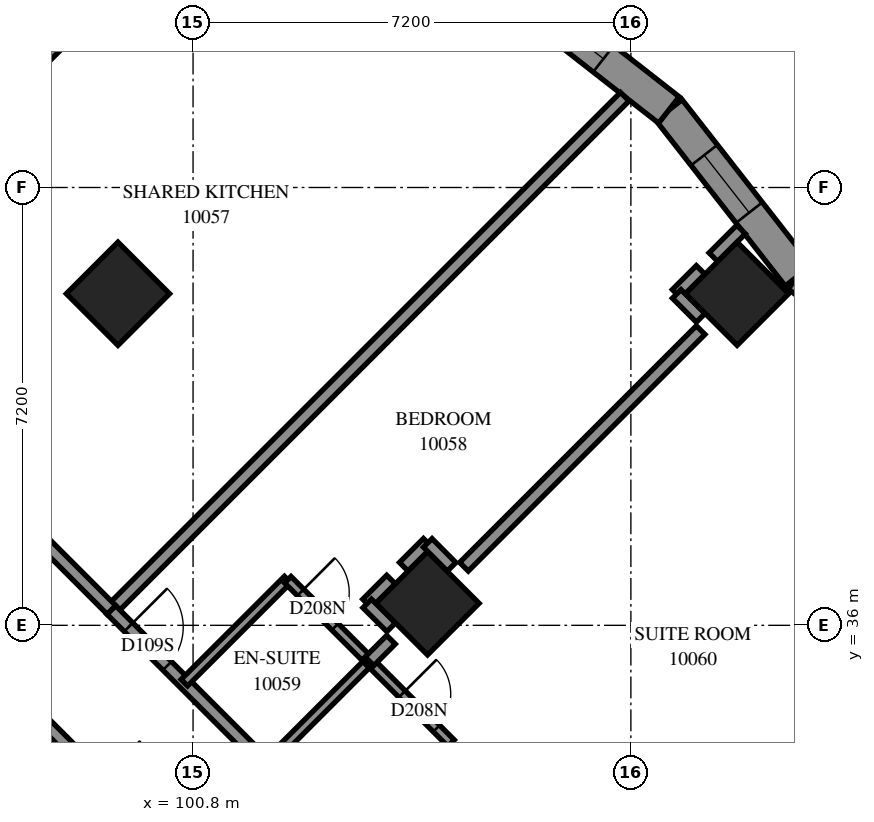
"""IFC4 building model, lengths in metres.
Left out: names, types, materials, properties, quantities, classifications, styles, units other than length and angle.
Written with IfcOpenShell. Run it as: python <this file> out.ifc"""

import sys

from ifc_helpers import new_model, si_unit, direction, frame, frame_2d, origin, origin_2d, place, context, subcontext, project, spatial, polyline, rectangle, outline, extrude, element, fill, save


model = new_model("IFC4")
c1 = context("Model", 3, precision=1e-05, world=origin(), true_north=direction((0.0, 1.0)))
c2 = subcontext(c1, "Body", "Model", "MODEL_VIEW")
j1 = project(units=[si_unit("LENGTHUNIT", "METRE"), si_unit("PLANEANGLEUNIT", "RADIAN")], contexts=[c1])
p1 = place(None, origin())
s1 = spatial("IfcSite", under=j1, at=p1, CompositionType="ELEMENT")
p2 = place(p1, origin())
s2 = spatial("IfcBuilding", under=s1, at=p2, CompositionType="ELEMENT")
p3 = place(p2, frame((0.0, 0.0, 40.6)))
s3 = spatial("IfcBuildingStorey", under=s2, at=p3, CompositionType="ELEMENT", Elevation=40.6)
for number, where, z_axis, x_axis in (
    (1, (99.565, 41.453, 0.0), (0.0, 0.0, 1.0), (0.707, -0.707, 0.0)),
    (2, (109.747, 41.453, 0.0), (0.0, 0.0, 1.0), (0.707, -0.707, 0.0)),
    (3, (104.656, 36.362, 0.0), (0.0, 0.0, 1.0), (0.707, -0.707, 0.0)),
):
    element("IfcColumn", number, at=place(p3, frame(where, z_axis=z_axis, x_axis=x_axis)), inside=s3, PredefinedType="COLUMN", context=c2, shape_type="SweptSolid", body=[
        extrude(rectangle(XDim=1.2, YDim=1.2, at=origin_2d()), origin(), (0.0, 0.0, 1.0), 3.1),
    ])
p4 = place(p3, frame((113.48, 39.621, 0.0), z_axis=(0.0, 0.0, 1.0), x_axis=(-0.7879331771, 0.6157607558, 0.0)))
e4 = element("IfcWall", 4, at=p4, inside=s3, PredefinedType="SOLIDWALL", context=c2, shape_type="SweptSolid", body=[
    extrude(outline(polyline([(-0.034, -0.275), (3.425, -0.275), (3.492, 0.275), (0.034, 0.275), (-0.034, -0.275)])), origin(), (0.0, 0.0, 1.0), 3.1),
])
p5 = place(p4, frame((1.198, 0.0, 0.5)))
e5 = element("IfcOpeningElement", 5, at=p5, cuts=e4, PredefinedType="OPENING", context=c2, shape_type="SweptSolid", body=[
    extrude(rectangle(XDim=1.2, YDim=2.45, at=frame_2d((0.6, 1.225))), frame((0.0, 0.285, 0.0), z_axis=(0.0, -1.0, 0.0), x_axis=(1.0, 0.0, 0.0)), (0.0, 0.0, 1.0), 0.57),
])
p6 = place(p3, frame((110.755, 41.75, 0.0), z_axis=(0.0, 0.0, 1.0), x_axis=(-0.6157787082, 0.7879191472, 0.0)))
e6 = element("IfcWall", 6, at=p6, inside=s3, PredefinedType="SOLIDWALL", context=c2, shape_type="SweptSolid", body=[
    extrude(outline(polyline([(0.034, -0.275), (3.492, -0.275), (3.425, 0.275), (-0.034, 0.275), (0.034, -0.275)])), origin(), (0.0, 0.0, 1.0), 3.1),
])
p7 = place(p6, frame((1.315, 0.0, 0.5)))
e7 = element("IfcOpeningElement", 7, at=p7, cuts=e6, PredefinedType="OPENING", context=c2, shape_type="SweptSolid", body=[
    extrude(rectangle(XDim=1.2, YDim=2.45, at=frame_2d((0.6, 1.225))), frame((0.0, 0.285, 0.0), z_axis=(0.0, -1.0, 0.0), x_axis=(1.0, 0.0, 0.0)), (0.0, 0.0, 1.0), 0.57),
])
p8 = place(p3, frame((108.626, 44.475, 0.0), z_axis=(0.0, 0.0, 1.0), x_axis=(-0.7879191472, 0.6157787082, 0.0)))
e8 = element("IfcWall", 8, at=p8, inside=s3, PredefinedType="SOLIDWALL", context=c2, shape_type="SweptSolid", body=[
    extrude(outline(polyline([(-0.034, -0.275), (3.425, -0.275), (3.492, 0.275), (0.034, 0.275), (-0.034, -0.275)])), origin(), (0.0, 0.0, 1.0), 3.1),
])
p9 = place(p8, frame((1.367, 0.0, 0.5)))
e9 = element("IfcOpeningElement", 9, at=p9, cuts=e8, PredefinedType="OPENING", context=c2, shape_type="SweptSolid", body=[
    extrude(rectangle(XDim=1.2, YDim=2.45, at=frame_2d((0.6, 1.225))), frame((0.0, 0.285, 0.0), z_axis=(0.0, -1.0, 0.0), x_axis=(1.0, 0.0, 0.0)), (0.0, 0.0, 1.0), 0.57),
])
p10 = place(p3, frame((99.459, 36.255, 0.0), z_axis=(0.0, 0.0, 1.0), x_axis=(0.7071905616, 0.7070229908, 0.0)))
e10 = element("IfcWall", 10, at=p10, inside=s3, PredefinedType="PARTITIONING", context=c2, shape_type="SweptSolid", body=[
    extrude(rectangle(XDim=11.935, YDim=0.2, at=frame_2d((5.968, 0.0))), origin(), (0.0, 0.0, 1.0), 3.1),
])
p11 = place(p3, frame((94.367, 41.349, 0.0), z_axis=(0.0, 0.0, 1.0), x_axis=(0.7071109856, 0.7071025768, 0.0)))
e11 = element("IfcWall", 11, at=p11, inside=s3, PredefinedType="PARTITIONING", context=c2, shape_type="SweptSolid", body=[
    extrude(rectangle(XDim=11.892, YDim=0.2, at=frame_2d((5.946, 0.0))), origin(), (0.0, 0.0, 1.0), 3.1),
])
p12 = place(p3, frame((93.59, 42.126, 0.0), z_axis=(0.0, 0.0, 1.0), x_axis=(0.7071067812, 0.7071067812, 0.0)))
e12 = element("IfcWall", 12, at=p12, inside=s3, PredefinedType="PARTITIONING", context=c2, shape_type="SweptSolid", body=[
    extrude(rectangle(XDim=9.849, YDim=0.2, at=frame_2d((4.924, 0.0))), origin(), (0.0, 0.0, 1.0), 3.1),
])
p13 = place(p12, frame((0.148, 0.0, 0.0)))
e13 = element("IfcOpeningElement", 13, at=p13, cuts=e12, PredefinedType="OPENING", context=c2, shape_type="SweptSolid", body=[
    extrude(rectangle(XDim=1.0, YDim=2.1, at=frame_2d((0.5, 1.05))), frame((0.0, 0.11, 0.0), z_axis=(0.0, -1.0, 0.0), x_axis=(1.0, 0.0, 0.0)), (0.0, 0.0, 1.0), 0.22),
])
p14 = place(p3, frame((99.455, 36.253, 0.0), z_axis=(0.0, 0.0, 1.0), x_axis=(0.7071067812, -0.7071067812, 0.0)))
e14 = element("IfcWall", 14, at=p14, inside=s3, PredefinedType="PARTITIONING", context=c2, shape_type="SweptSolid", body=[
    extrude(rectangle(XDim=7.201, YDim=0.2, at=frame_2d((3.601, 0.0))), origin(), (0.0, 0.0, 1.0), 3.1),
])
p15 = place(p14, frame((0.401, 0.0, 0.0)))
e15 = element("IfcOpeningElement", 15, at=p15, cuts=e14, PredefinedType="OPENING", context=c2, shape_type="SweptSolid", body=[
    extrude(rectangle(XDim=0.9, YDim=2.1, at=frame_2d((0.45, 1.05))), frame((0.0, 0.11, 0.0), z_axis=(0.0, -1.0, 0.0), x_axis=(1.0, 0.0, 0.0)), (0.0, 0.0, 1.0), 0.22),
])
for number, where, z_axis, x_axis in (
    (16, (110.345, 31.871, 0.0), (0.0, 0.0, 1.0), (0.707, 0.707, 0.0)),
    (17, (105.255, 36.963, 0.0), (0.0, 0.0, 1.0), (0.707, 0.707, 0.0)),
):
    element("IfcWall", number, at=place(p3, frame(where, z_axis=z_axis, x_axis=x_axis)), inside=s3, PredefinedType="PARTITIONING", context=c2, shape_type="SweptSolid", body=[
        extrude(rectangle(XDim=5.504, YDim=0.2, at=frame_2d((2.752, 0.0))), origin(), (0.0, 0.0, 1.0), 3.1),
    ])
p16 = place(p3, frame((96.913, 38.801, 0.0), z_axis=(0.0, 0.0, 1.0), x_axis=(0.7068288851, -0.7073845681, 0.0)))
e18 = element("IfcWall", 18, at=p16, inside=s3, PredefinedType="PARTITIONING", context=c2, shape_type="SweptSolid", body=[
    extrude(rectangle(XDim=3.599, YDim=0.2, at=frame_2d((1.8, 0.0))), origin(), (0.0, 0.0, 1.0), 3.1),
])
p17 = place(p3, frame((97.976, 34.772, 0.0), z_axis=(0.0, 0.0, 1.0), x_axis=(0.7073845681, -0.7068288851, 0.0)))
e19 = element("IfcWall", 19, at=p17, inside=s3, PredefinedType="PARTITIONING", context=c2, shape_type="SweptSolid", body=[
    extrude(rectangle(XDim=3.599, YDim=0.2, at=frame_2d((1.8, 0.0))), origin(), (0.0, 0.0, 1.0), 3.1),
])
p18 = place(p17, frame((1.858, 0.0, 0.0)))
e20 = element("IfcOpeningElement", 20, at=p18, cuts=e19, PredefinedType="OPENING", context=c2, shape_type="SweptSolid", body=[
    extrude(rectangle(XDim=0.9, YDim=2.1, at=frame_2d((0.45, 1.05))), frame((0.0, 0.11, 0.0), z_axis=(0.0, -1.0, 0.0), x_axis=(1.0, 0.0, 0.0)), (0.0, 0.0, 1.0), 0.22),
])
p19 = place(p3, frame((102.003, 33.711, 0.0), z_axis=(0.0, 0.0, 1.0), x_axis=(0.7071067812, 0.7071067812, 0.0)))
e21 = element("IfcWall", 21, at=p19, inside=s3, PredefinedType="PARTITIONING", context=c2, shape_type="SweptSolid", body=[
    extrude(rectangle(XDim=2.401, YDim=0.15, at=frame_2d((1.201, 0.0))), origin(), (0.0, 0.0, 1.0), 3.1),
])
for number, where, z_axis, x_axis in (
    (22, (100.657, 35.057, 0.0), (0.0, 0.0, 1.0), (0.708, 0.707, 0.0)),
    (23, (103.349, 32.365, 0.0), (0.0, 0.0, 1.0), (0.707, 0.708, 0.0)),
):
    element("IfcWall", number, at=place(p3, frame(where, z_axis=z_axis, x_axis=x_axis)), inside=s3, PredefinedType="PARTITIONING", context=c2, shape_type="SweptSolid", body=[
        extrude(rectangle(XDim=2.4, YDim=0.15, at=frame_2d((1.2, 0.0))), origin(), (0.0, 0.0, 1.0), 3.1),
    ])
p20 = place(p3, frame((103.701, 35.407, 0.0), z_axis=(0.0, 0.0, 1.0), x_axis=(0.7065800724, -0.7076330979, 0.0)))
e24 = element("IfcWall", 24, at=p20, inside=s3, PredefinedType="PARTITIONING", context=c2, shape_type="SweptSolid", body=[
    extrude(rectangle(XDim=1.899, YDim=0.15, at=frame_2d((0.95, 0.0))), origin(), (0.0, 0.0, 1.0), 3.1),
])
p21 = place(p20, frame((0.759, 0.0, 0.0)))
e25 = element("IfcOpeningElement", 25, at=p21, cuts=e24, PredefinedType="OPENING", context=c2, shape_type="SweptSolid", body=[
    extrude(rectangle(XDim=0.8, YDim=2.1, at=frame_2d((0.4, 1.05))), frame((0.0, 0.085, 0.0), z_axis=(0.0, -1.0, 0.0), x_axis=(1.0, 0.0, 0.0)), (0.0, 0.0, 1.0), 0.17),
])
p22 = place(p3, frame((102.358, 36.75, 0.0), z_axis=(0.0, 0.0, 1.0), x_axis=(0.7076330979, -0.7065800724, 0.0)))
e26 = element("IfcWall", 26, at=p22, inside=s3, PredefinedType="PARTITIONING", context=c2, shape_type="SweptSolid", body=[
    extrude(rectangle(XDim=1.899, YDim=0.15, at=frame_2d((0.95, 0.0))), origin(), (0.0, 0.0, 1.0), 3.1),
])
p23 = place(p22, frame((0.296, 0.0, 0.0)))
e27 = element("IfcOpeningElement", 27, at=p23, cuts=e26, PredefinedType="OPENING", context=c2, shape_type="SweptSolid", body=[
    extrude(rectangle(XDim=0.8, YDim=2.1, at=frame_2d((0.4, 1.05))), frame((0.0, 0.085, 0.0), z_axis=(0.0, -1.0, 0.0), x_axis=(1.0, 0.0, 0.0)), (0.0, 0.0, 1.0), 0.17),
])
p24 = place(p3, frame((109.357, 42.055, 0.0), z_axis=(0.0, 0.0, 1.0), x_axis=(0.7071067812, 0.7071067812, 0.0)))
e28 = element("IfcWall", 28, at=p24, inside=s3, PredefinedType="PARTITIONING", context=c2, shape_type="SweptSolid", body=[
    extrude(rectangle(XDim=0.644, YDim=0.2, at=frame_2d((0.322, 0.0))), origin(), (0.0, 0.0, 1.0), 3.1),
])
for number, where, z_axis, x_axis in (
    (29, (108.753, 41.451, 0.0), (0.0, 0.0, 1.0), (0.707, 0.707, 0.0)),
    (30, (108.754, 41.45, 0.0), (0.0, 0.0, 1.0), (0.707, -0.707, 0.0)),
    (31, (103.661, 36.359, 0.0), (0.0, 0.0, 1.0), (0.707, 0.707, 0.0)),
    (32, (104.265, 36.963, 0.0), (0.0, 0.0, 1.0), (0.707, 0.707, 0.0)),
):
    element("IfcWall", number, at=place(p3, frame(where, z_axis=z_axis, x_axis=x_axis)), inside=s3, PredefinedType="PARTITIONING", context=c2, shape_type="SweptSolid", body=[
        extrude(rectangle(XDim=0.557, YDim=0.2, at=frame_2d((0.279, 0.0))), origin(), (0.0, 0.0, 1.0), 3.1),
    ])
for number, where, z_axis, x_axis in (
    (33, (104.659, 37.355, 0.0), (0.0, 0.0, 1.0), (0.705, -0.709, 0.0)),
    (34, (103.664, 36.36, 0.0), (0.0, 0.0, 1.0), (0.709, -0.705, 0.0)),
):
    element("IfcWall", number, at=place(p3, frame(where, z_axis=z_axis, x_axis=x_axis)), inside=s3, PredefinedType="PARTITIONING", context=c2, shape_type="SweptSolid", body=[
        extrude(rectangle(XDim=0.556, YDim=0.2, at=frame_2d((0.278, 0.0))), origin(), (0.0, 0.0, 1.0), 3.1),
    ])
p25 = place(p3, frame((103.701, 35.409, 0.0), z_axis=(0.0, 0.0, 1.0), x_axis=(0.7071067812, 0.7071067812, 0.0)))
e35 = element("IfcWall", 35, at=p25, inside=s3, PredefinedType="PARTITIONING", context=c2, shape_type="SweptSolid", body=[
    extrude(rectangle(XDim=0.501, YDim=0.2, at=frame_2d((0.25, 0.0))), origin(), (0.0, 0.0, 1.0), 3.1),
])
p26 = place(p7, origin())
e36 = element("IfcWindow", 36, at=p26, inside=s3, PartitioningType="SINGLE_PANEL", PredefinedType="WINDOW", context=c2, shape_type="SweptSolid", body=[
    extrude(rectangle(XDim=1.2, YDim=2.45, at=frame_2d((0.6, 1.225))), frame((0.0, 0.155, 0.0), z_axis=(0.0, -1.0, 0.0), x_axis=(1.0, 0.0, 0.0)), (0.0, 0.0, 1.0), 0.06),
])
fill(e7, e36)
p27 = place(p9, origin())
e37 = element("IfcWindow", 37, at=p27, inside=s3, PartitioningType="SINGLE_PANEL", PredefinedType="WINDOW", context=c2, shape_type="SweptSolid", body=[
    extrude(rectangle(XDim=1.2, YDim=2.45, at=frame_2d((0.6, 1.225))), frame((0.0, 0.155, 0.0), z_axis=(0.0, -1.0, 0.0), x_axis=(1.0, 0.0, 0.0)), (0.0, 0.0, 1.0), 0.06),
])
fill(e9, e37)
p28 = place(p15, origin())
e38 = element("IfcDoor", 38, at=p28, inside=s3, OperationType="SINGLE_SWING_RIGHT", PredefinedType="DOOR", context=c2, shape_type="SweptSolid", body=[
    extrude(rectangle(XDim=0.9, YDim=2.1, at=frame_2d((0.45, 1.05))), frame((0.0, 0.025, 0.0), z_axis=(0.0, -1.0, 0.0), x_axis=(1.0, 0.0, 0.0)), (0.0, 0.0, 1.0), 0.05),
])
fill(e15, e38)
p29 = place(p23, origin())
e39 = element("IfcDoor", 39, at=p29, inside=s3, OperationType="SINGLE_SWING_RIGHT", PredefinedType="DOOR", context=c2, shape_type="SweptSolid", body=[
    extrude(rectangle(XDim=0.8, YDim=2.1, at=frame_2d((0.4, 1.05))), frame((0.0, 0.025, 0.0), z_axis=(0.0, -1.0, 0.0), x_axis=(1.0, 0.0, 0.0)), (0.0, 0.0, 1.0), 0.05),
])
fill(e27, e39)
p30 = place(p21, origin())
e40 = element("IfcDoor", 40, at=p30, inside=s3, OperationType="SINGLE_SWING_RIGHT", PredefinedType="DOOR", context=c2, shape_type="SweptSolid", body=[
    extrude(rectangle(XDim=0.8, YDim=2.1, at=frame_2d((0.4, 1.05))), frame((0.0, 0.025, 0.0), z_axis=(0.0, -1.0, 0.0), x_axis=(1.0, 0.0, 0.0)), (0.0, 0.0, 1.0), 0.05),
])
fill(e25, e40)
save(model, sys.argv[1])
